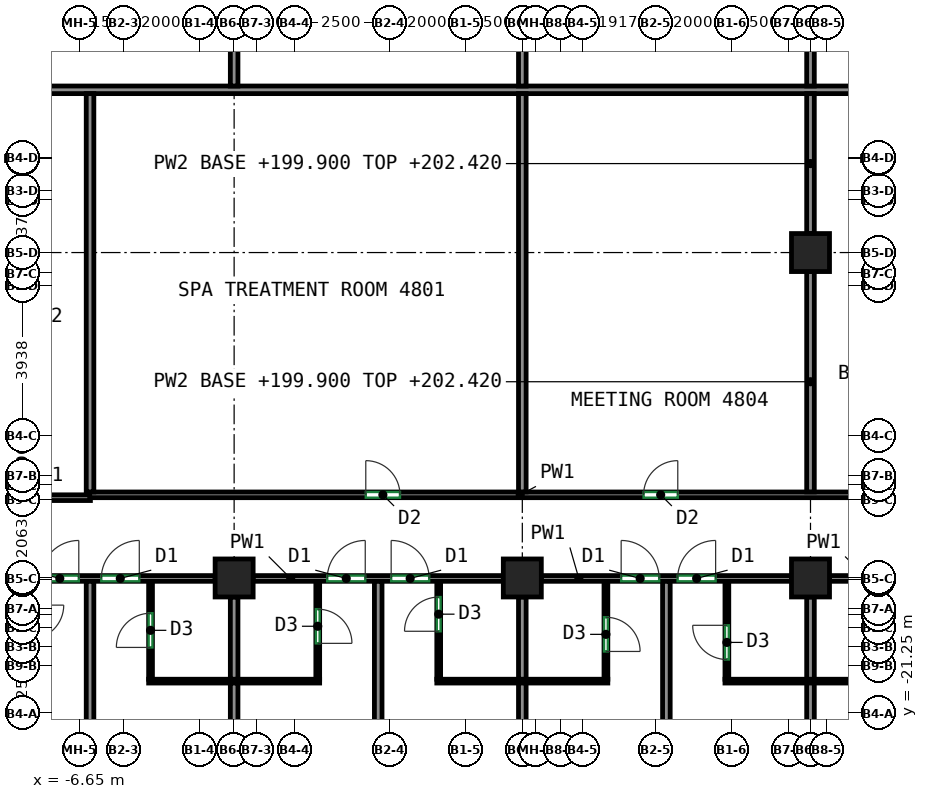
"""IFC4 building model, lengths in metres.
Left out: names, types, materials, properties, quantities, classifications, styles, units other than length and angle.
Written with IfcOpenShell. Run it as: python <this file> out.ifc"""

import sys

from ifc_helpers import new_model, si_unit, direction, frame, frame_2d, origin, origin_2d, place, context, subcontext, project, spatial, rectangle, extrude, source, transform, mapped, element, fill, save


model = new_model("IFC4")
c1 = context("Model", 3, precision=1e-05, world=origin(), true_north=direction((0.0, 1.0)))
c2 = subcontext(c1, "Body", "Model", "MODEL_VIEW")
j1 = project(units=[si_unit("LENGTHUNIT", "METRE"), si_unit("PLANEANGLEUNIT", "RADIAN")], contexts=[c1])
p1 = place(None, origin())
s1 = spatial("IfcSite", under=j1, at=p1, CompositionType="ELEMENT")
p2 = place(p1, origin())
s2 = spatial("IfcBuilding", under=s1, at=p2, CompositionType="ELEMENT")
p3 = place(p2, frame((0.0, 0.0, 199.9)))
s3 = spatial("IfcBuildingStorey", under=s2, at=p3, CompositionType="ELEMENT", Elevation=199.9)
m1 = source(origin(), c2, "Body", "SweptSolid", [
    extrude(rectangle(XDim=1.0, YDim=1.0, at=origin_2d()), origin(), (0.0, 0.0, 1.0), 3.12),
])
for number, where, z_axis, x_axis in (
    (1, (-2.583, -17.688, 0.0), (0.0, 0.0, 1.0), (1.0, 0.0, 0.0)),
    (2, (5.0, -17.688, 0.0), (0.0, 0.0, 1.0), (1.0, 0.0, 0.0)),
    (3, (12.583, -17.688, 0.0), (0.0, 0.0, 1.0), (1.0, 0.0, 0.0)),
    (4, (12.583, -9.125, 0.0), (0.0, 0.0, 1.0), (1.0, 0.0, 0.0)),
):
    element("IfcColumn", number, at=place(p3, frame(where, z_axis=z_axis, x_axis=x_axis)), inside=s3, PredefinedType="COLUMN", context=c2, shape_type="MappedRepresentation", body=[
        mapped(m1, transform((0.0, 0.0, 0.0))),
    ])
p4 = place(p3, frame((-9.667, -17.7, 0.0), z_axis=(0.0, 0.0, 1.0), x_axis=(1.0, 0.0, 0.0)))
e5 = element("IfcWall", 5, at=p4, inside=s3, PredefinedType="PARTITIONING", context=c2, shape_type="SweptSolid", body=[
    extrude(rectangle(XDim=6.584, YDim=0.15, at=frame_2d((3.292, 0.0))), origin(), (0.0, 0.0, 1.0), 3.12),
])
p5 = place(p4, frame((1.996, 0.0, 0.0)))
e6 = element("IfcOpeningElement", 6, at=p5, cuts=e5, PredefinedType="OPENING", context=c2, shape_type="SweptSolid", body=[
    extrude(rectangle(XDim=1.0, YDim=2.1, at=frame_2d((0.5, 1.05))), frame((0.0, 0.085, 0.0), z_axis=(0.0, -1.0, 0.0), x_axis=(1.0, 0.0, 0.0)), (0.0, 0.0, 1.0), 0.17),
])
p6 = place(p4, frame((3.588, 0.0, 0.0)))
e7 = element("IfcOpeningElement", 7, at=p6, cuts=e5, PredefinedType="OPENING", context=c2, shape_type="SweptSolid", body=[
    extrude(rectangle(XDim=1.0, YDim=2.1, at=frame_2d((0.5, 1.05))), frame((0.0, 0.085, 0.0), z_axis=(0.0, -1.0, 0.0), x_axis=(1.0, 0.0, 0.0)), (0.0, 0.0, 1.0), 0.17),
])
p7 = place(p3, frame((-2.083, -17.7, 0.0), z_axis=(0.0, 0.0, 1.0), x_axis=(1.0, 0.0, 0.0)))
e8 = element("IfcWall", 8, at=p7, inside=s3, PredefinedType="PARTITIONING", context=c2, shape_type="SweptSolid", body=[
    extrude(rectangle(XDim=6.583, YDim=0.15, at=frame_2d((3.292, 0.0))), origin(), (0.0, 0.0, 1.0), 3.12),
])
p8 = place(p7, frame((1.95, 0.0, 0.0)))
e9 = element("IfcOpeningElement", 9, at=p8, cuts=e8, PredefinedType="OPENING", context=c2, shape_type="SweptSolid", body=[
    extrude(rectangle(XDim=1.0, YDim=2.1, at=frame_2d((0.5, 1.05))), frame((0.0, 0.085, 0.0), z_axis=(0.0, -1.0, 0.0), x_axis=(1.0, 0.0, 0.0)), (0.0, 0.0, 1.0), 0.17),
])
p9 = place(p7, frame((3.632, 0.0, 0.0)))
e10 = element("IfcOpeningElement", 10, at=p9, cuts=e8, PredefinedType="OPENING", context=c2, shape_type="SweptSolid", body=[
    extrude(rectangle(XDim=1.0, YDim=2.1, at=frame_2d((0.5, 1.05))), frame((0.0, 0.085, 0.0), z_axis=(0.0, -1.0, 0.0), x_axis=(1.0, 0.0, 0.0)), (0.0, 0.0, 1.0), 0.17),
])
p10 = place(p3, frame((5.5, -17.7, 0.0), z_axis=(0.0, 0.0, 1.0), x_axis=(1.0, 0.0, 0.0)))
e11 = element("IfcWall", 11, at=p10, inside=s3, PredefinedType="PARTITIONING", context=c2, shape_type="SweptSolid", body=[
    extrude(rectangle(XDim=6.583, YDim=0.15, at=frame_2d((3.292, 0.0))), origin(), (0.0, 0.0, 1.0), 3.12),
])
p11 = place(p10, frame((2.101, 0.0, 0.0)))
e12 = element("IfcOpeningElement", 12, at=p11, cuts=e11, PredefinedType="OPENING", context=c2, shape_type="SweptSolid", body=[
    extrude(rectangle(XDim=1.0, YDim=2.1, at=frame_2d((0.5, 1.05))), frame((0.0, 0.085, 0.0), z_axis=(0.0, -1.0, 0.0), x_axis=(1.0, 0.0, 0.0)), (0.0, 0.0, 1.0), 0.17),
])
p12 = place(p10, frame((3.587, 0.0, 0.0)))
e13 = element("IfcOpeningElement", 13, at=p12, cuts=e11, PredefinedType="OPENING", context=c2, shape_type="SweptSolid", body=[
    extrude(rectangle(XDim=1.0, YDim=2.1, at=frame_2d((0.5, 1.05))), frame((0.0, 0.085, 0.0), z_axis=(0.0, -1.0, 0.0), x_axis=(1.0, 0.0, 0.0)), (0.0, 0.0, 1.0), 0.17),
])
p13 = place(p3, frame((13.083, -17.7, 0.0), z_axis=(0.0, 0.0, 1.0), x_axis=(1.0, 0.0, 0.0)))
e14 = element("IfcWall", 14, at=p13, inside=s3, PredefinedType="PARTITIONING", context=c2, shape_type="SweptSolid", body=[
    extrude(rectangle(XDim=6.584, YDim=0.15, at=frame_2d((3.292, 0.0))), origin(), (0.0, 0.0, 1.0), 3.12),
])
p14 = place(p13, frame((1.996, 0.0, 0.0)))
e15 = element("IfcOpeningElement", 15, at=p14, cuts=e14, PredefinedType="OPENING", context=c2, shape_type="SweptSolid", body=[
    extrude(rectangle(XDim=1.0, YDim=2.1, at=frame_2d((0.5, 1.05))), frame((0.0, 0.085, 0.0), z_axis=(0.0, -1.0, 0.0), x_axis=(1.0, 0.0, 0.0)), (0.0, 0.0, 1.0), 0.17),
])
p15 = place(p13, frame((3.588, 0.0, 0.0)))
e16 = element("IfcOpeningElement", 16, at=p15, cuts=e14, PredefinedType="OPENING", context=c2, shape_type="SweptSolid", body=[
    extrude(rectangle(XDim=1.0, YDim=2.1, at=frame_2d((0.5, 1.05))), frame((0.0, 0.085, 0.0), z_axis=(0.0, -1.0, 0.0), x_axis=(1.0, 0.0, 0.0)), (0.0, 0.0, 1.0), 0.17),
])
p16 = place(p3, frame((-6.365, -15.575, 0.0), z_axis=(0.0, 0.0, 1.0), x_axis=(-1.0, 0.0, 0.0)))
e17 = element("IfcWall", 17, at=p16, inside=s3, PredefinedType="PARTITIONING", context=c2, shape_type="SweptSolid", body=[
    extrude(rectangle(XDim=7.185, YDim=0.15, at=frame_2d((3.593, 0.0))), origin(), (0.0, 0.0, 1.0), 3.12),
])
p17 = place(p16, frame((3.143, 0.0, 0.0)))
e18 = element("IfcOpeningElement", 18, at=p17, cuts=e17, PredefinedType="OPENING", context=c2, shape_type="SweptSolid", body=[
    extrude(rectangle(XDim=0.9, YDim=2.1, at=frame_2d((0.45, 1.05))), frame((0.0, 0.085, 0.0), z_axis=(0.0, -1.0, 0.0), x_axis=(1.0, 0.0, 0.0)), (0.0, 0.0, 1.0), 0.17),
])
p18 = place(p3, frame((-6.385, -15.5, 0.0), z_axis=(0.0, 0.0, 1.0), x_axis=(1.0, 0.0, 0.0)))
e19 = element("IfcWall", 19, at=p18, inside=s3, PredefinedType="PARTITIONING", context=c2, shape_type="SweptSolid", body=[
    extrude(rectangle(XDim=22.66, YDim=0.15, at=frame_2d((11.33, 0.0))), origin(), (0.0, 0.0, 1.0), 3.12),
])
p19 = place(p18, frame((7.266, 0.0, 0.0)))
e20 = element("IfcOpeningElement", 20, at=p19, cuts=e19, PredefinedType="OPENING", context=c2, shape_type="SweptSolid", body=[
    extrude(rectangle(XDim=0.9, YDim=2.1, at=frame_2d((0.45, 1.05))), frame((0.0, 0.085, 0.0), z_axis=(0.0, -1.0, 0.0), x_axis=(1.0, 0.0, 0.0)), (0.0, 0.0, 1.0), 0.17),
])
p20 = place(p18, frame((14.576, 0.0, 0.0)))
e21 = element("IfcOpeningElement", 21, at=p20, cuts=e19, PredefinedType="OPENING", context=c2, shape_type="SweptSolid", body=[
    extrude(rectangle(XDim=0.9, YDim=2.1, at=frame_2d((0.45, 1.05))), frame((0.0, 0.085, 0.0), z_axis=(0.0, -1.0, 0.0), x_axis=(1.0, 0.0, 0.0)), (0.0, 0.0, 1.0), 0.17),
])
p21 = place(p3, frame((-6.375, -26.0, 0.0), z_axis=(0.0, 0.0, 1.0), x_axis=(0.0, 1.0, 0.0)))
e22 = element("IfcWall", 22, at=p21, inside=s3, PredefinedType="PARTITIONING", context=c2, shape_type="SweptSolid", body=[
    extrude(rectangle(XDim=8.223, YDim=0.2, at=frame_2d((4.111, 0.0))), origin(), (0.0, 0.0, 1.0), 3.12),
])
p22 = place(p3, frame((-4.783, -20.352, 0.0), z_axis=(0.0, 0.0, 1.0), x_axis=(0.0, 1.0, 0.0)))
e23 = element("IfcWall", 23, at=p22, inside=s3, PredefinedType="PARTITIONING", context=c2, shape_type="SweptSolid", body=[
    extrude(rectangle(XDim=2.575, YDim=0.1, at=frame_2d((1.288, 0.0))), origin(), (0.0, 0.0, 1.0), 3.12),
])
p23 = place(p22, frame((0.837, 0.0, 0.0)))
e24 = element("IfcOpeningElement", 24, at=p23, cuts=e23, PredefinedType="OPENING", context=c2, shape_type="SweptSolid", body=[
    extrude(rectangle(XDim=0.9, YDim=2.1, at=frame_2d((0.45, 1.05))), frame((0.0, 0.06, 0.0), z_axis=(0.0, -1.0, 0.0), x_axis=(1.0, 0.0, 0.0)), (0.0, 0.0, 1.0), 0.12),
])
p24 = place(p3, frame((-4.833, -20.402, 0.0), z_axis=(0.0, 0.0, 1.0), x_axis=(1.0, 0.0, 0.0)))
e25 = element("IfcWall", 25, at=p24, inside=s3, PredefinedType="PARTITIONING", context=c2, shape_type="SweptSolid", body=[
    extrude(rectangle(XDim=4.5, YDim=0.1, at=frame_2d((2.25, 0.0))), origin(), (0.0, 0.0, 1.0), 3.12),
])
p25 = place(p3, frame((-2.583, -25.425, 0.0), z_axis=(0.0, 0.0, 1.0), x_axis=(0.0, 1.0, 0.0)))
e26 = element("IfcWall", 26, at=p25, inside=s3, PredefinedType="PARTITIONING", context=c2, shape_type="SweptSolid", body=[
    extrude(rectangle(XDim=4.973, YDim=0.2, at=frame_2d((2.487, 0.0))), origin(), (0.0, 0.0, 1.0), 3.12),
])
p26 = place(p3, frame((-2.583, -20.352, 0.0), z_axis=(0.0, 0.0, 1.0), x_axis=(0.0, 1.0, 0.0)))
e27 = element("IfcWall", 27, at=p26, inside=s3, PredefinedType="PARTITIONING", context=c2, shape_type="SweptSolid", body=[
    extrude(rectangle(XDim=2.164, YDim=0.2, at=frame_2d((1.082, 0.0))), origin(), (0.0, 0.0, 1.0), 3.12),
])
p27 = place(p3, frame((-0.383, -17.777, 0.0), z_axis=(0.0, 0.0, 1.0), x_axis=(0.0, -1.0, 0.0)))
e28 = element("IfcWall", 28, at=p27, inside=s3, PredefinedType="PARTITIONING", context=c2, shape_type="SweptSolid", body=[
    extrude(rectangle(XDim=2.575, YDim=0.1, at=frame_2d((1.288, 0.0))), origin(), (0.0, 0.0, 1.0), 3.12),
])
p28 = place(p27, frame((0.731, 0.0, 0.0)))
e29 = element("IfcOpeningElement", 29, at=p28, cuts=e28, PredefinedType="OPENING", context=c2, shape_type="SweptSolid", body=[
    extrude(rectangle(XDim=0.9, YDim=2.1, at=frame_2d((0.45, 1.05))), frame((0.0, 0.06, 0.0), z_axis=(0.0, -1.0, 0.0), x_axis=(1.0, 0.0, 0.0)), (0.0, 0.0, 1.0), 0.12),
])
p29 = place(p3, frame((1.208, -26.0, 0.0), z_axis=(0.0, 0.0, 1.0), x_axis=(0.0, 1.0, 0.0)))
e30 = element("IfcWall", 30, at=p29, inside=s3, PredefinedType="PARTITIONING", context=c2, shape_type="SweptSolid", body=[
    extrude(rectangle(XDim=8.223, YDim=0.2, at=frame_2d((4.111, 0.0))), origin(), (0.0, 0.0, 1.0), 3.12),
])
p30 = place(p3, frame((2.8, -20.352, 0.0), z_axis=(0.0, 0.0, 1.0), x_axis=(0.0, 1.0, 0.0)))
e31 = element("IfcWall", 31, at=p30, inside=s3, PredefinedType="PARTITIONING", context=c2, shape_type="SweptSolid", body=[
    extrude(rectangle(XDim=2.575, YDim=0.1, at=frame_2d((1.288, 0.0))), origin(), (0.0, 0.0, 1.0), 3.12),
])
p31 = place(p30, frame((1.262, 0.0, 0.0)))
e32 = element("IfcOpeningElement", 32, at=p31, cuts=e31, PredefinedType="OPENING", context=c2, shape_type="SweptSolid", body=[
    extrude(rectangle(XDim=0.9, YDim=2.1, at=frame_2d((0.45, 1.05))), frame((0.0, 0.06, 0.0), z_axis=(0.0, -1.0, 0.0), x_axis=(1.0, 0.0, 0.0)), (0.0, 0.0, 1.0), 0.12),
])
p32 = place(p3, frame((2.75, -20.402, 0.0), z_axis=(0.0, 0.0, 1.0), x_axis=(1.0, 0.0, 0.0)))
e33 = element("IfcWall", 33, at=p32, inside=s3, PredefinedType="PARTITIONING", context=c2, shape_type="SweptSolid", body=[
    extrude(rectangle(XDim=4.5, YDim=0.1, at=frame_2d((2.25, 0.0))), origin(), (0.0, 0.0, 1.0), 3.12),
])
p33 = place(p3, frame((5.0, -25.425, 0.0), z_axis=(0.0, 0.0, 1.0), x_axis=(0.0, 1.0, 0.0)))
e34 = element("IfcWall", 34, at=p33, inside=s3, PredefinedType="PARTITIONING", context=c2, shape_type="SweptSolid", body=[
    extrude(rectangle(XDim=4.973, YDim=0.2, at=frame_2d((2.487, 0.0))), origin(), (0.0, 0.0, 1.0), 3.12),
])
p34 = place(p3, frame((5.0, -20.352, 0.0), z_axis=(0.0, 0.0, 1.0), x_axis=(0.0, 1.0, 0.0)))
e35 = element("IfcWall", 35, at=p34, inside=s3, PredefinedType="PARTITIONING", context=c2, shape_type="SweptSolid", body=[
    extrude(rectangle(XDim=2.164, YDim=0.2, at=frame_2d((1.082, 0.0))), origin(), (0.0, 0.0, 1.0), 3.12),
])
p35 = place(p3, frame((7.2, -17.777, 0.0), z_axis=(0.0, 0.0, 1.0), x_axis=(0.0, -1.0, 0.0)))
e36 = element("IfcWall", 36, at=p35, inside=s3, PredefinedType="PARTITIONING", context=c2, shape_type="SweptSolid", body=[
    extrude(rectangle(XDim=2.575, YDim=0.1, at=frame_2d((1.288, 0.0))), origin(), (0.0, 0.0, 1.0), 3.12),
])
p36 = place(p35, frame((0.944, 0.0, 0.0)))
e37 = element("IfcOpeningElement", 37, at=p36, cuts=e36, PredefinedType="OPENING", context=c2, shape_type="SweptSolid", body=[
    extrude(rectangle(XDim=0.9, YDim=2.1, at=frame_2d((0.45, 1.05))), frame((0.0, 0.06, 0.0), z_axis=(0.0, -1.0, 0.0), x_axis=(1.0, 0.0, 0.0)), (0.0, 0.0, 1.0), 0.12),
])
p37 = place(p3, frame((8.791, -26.0, 0.0), z_axis=(0.0, 0.0, 1.0), x_axis=(0.0, 1.0, 0.0)))
e38 = element("IfcWall", 38, at=p37, inside=s3, PredefinedType="PARTITIONING", context=c2, shape_type="SweptSolid", body=[
    extrude(rectangle(XDim=8.223, YDim=0.2, at=frame_2d((4.111, 0.0))), origin(), (0.0, 0.0, 1.0), 3.12),
])
p38 = place(p3, frame((10.383, -20.352, 0.0), z_axis=(0.0, 0.0, 1.0), x_axis=(0.0, 1.0, 0.0)))
e39 = element("IfcWall", 39, at=p38, inside=s3, PredefinedType="PARTITIONING", context=c2, shape_type="SweptSolid", body=[
    extrude(rectangle(XDim=2.575, YDim=0.1, at=frame_2d((1.288, 0.0))), origin(), (0.0, 0.0, 1.0), 3.12),
])
p39 = place(p38, frame((0.519, 0.0, 0.0)))
e40 = element("IfcOpeningElement", 40, at=p39, cuts=e39, PredefinedType="OPENING", context=c2, shape_type="SweptSolid", body=[
    extrude(rectangle(XDim=0.9, YDim=2.1, at=frame_2d((0.45, 1.05))), frame((0.0, 0.06, 0.0), z_axis=(0.0, -1.0, 0.0), x_axis=(1.0, 0.0, 0.0)), (0.0, 0.0, 1.0), 0.12),
])
p40 = place(p3, frame((10.333, -20.402, 0.0), z_axis=(0.0, 0.0, 1.0), x_axis=(1.0, 0.0, 0.0)))
e41 = element("IfcWall", 41, at=p40, inside=s3, PredefinedType="PARTITIONING", context=c2, shape_type="SweptSolid", body=[
    extrude(rectangle(XDim=4.5, YDim=0.1, at=frame_2d((2.25, 0.0))), origin(), (0.0, 0.0, 1.0), 3.12),
])
p41 = place(p3, frame((12.583, -25.425, 0.0), z_axis=(0.0, 0.0, 1.0), x_axis=(0.0, 1.0, 0.0)))
e42 = element("IfcWall", 42, at=p41, inside=s3, PredefinedType="PARTITIONING", context=c2, shape_type="SweptSolid", body=[
    extrude(rectangle(XDim=4.973, YDim=0.2, at=frame_2d((2.487, 0.0))), origin(), (0.0, 0.0, 1.0), 3.12),
])
p42 = place(p3, frame((12.583, -20.352, 0.0), z_axis=(0.0, 0.0, 1.0), x_axis=(0.0, 1.0, 0.0)))
e43 = element("IfcWall", 43, at=p42, inside=s3, PredefinedType="PARTITIONING", context=c2, shape_type="SweptSolid", body=[
    extrude(rectangle(XDim=2.164, YDim=0.2, at=frame_2d((1.082, 0.0))), origin(), (0.0, 0.0, 1.0), 3.12),
])
p43 = place(p3, frame((-13.873, -4.843, 0.0), z_axis=(0.0, 0.0, 1.0), x_axis=(1.0, 0.0, 0.0)))
e44 = element("IfcWall", 44, at=p43, inside=s3, PredefinedType="PARTITIONING", context=c2, shape_type="SweptSolid", body=[
    extrude(rectangle(XDim=30.146, YDim=0.2, at=frame_2d((15.073, 0.0))), origin(), (0.0, 0.0, 1.0), 3.12),
])
for number, where, z_axis, x_axis in (
    (45, (-2.583, -4.743, 0.0), (0.0, 0.0, 1.0), (0.0, 1.0, 0.0)),
    (46, (5.0, -4.743, 0.0), (0.0, 0.0, 1.0), (0.0, 1.0, 0.0)),
):
    element("IfcWall", number, at=place(p3, frame(where, z_axis=z_axis, x_axis=x_axis)), inside=s3, PredefinedType="PARTITIONING", context=c2, shape_type="SweptSolid", body=[
        extrude(rectangle(XDim=8.366, YDim=0.2, at=frame_2d((4.183, 0.0))), origin(), (0.0, 0.0, 1.0), 3.12),
    ])
p44 = place(p3, frame((12.583, -4.743, 0.0), z_axis=(0.0, 0.0, 1.0), x_axis=(0.0, 1.0, 0.0)))
e47 = element("IfcWall", 47, at=p44, inside=s3, PredefinedType="PARTITIONING", context=c2, shape_type="SweptSolid", body=[
    extrude(rectangle(XDim=3.681, YDim=0.2, at=frame_2d((1.84, 0.0))), origin(), (0.0, 0.0, 1.0), 2.52),
])
for number, where, z_axis, x_axis in (
    (48, (-6.375, -15.423, 0.0), (0.0, 0.0, 1.0), (0.0, 1.0, 0.0)),
    (49, (5.0, -15.423, 0.0), (0.0, 0.0, 1.0), (0.0, 1.0, 0.0)),
):
    element("IfcWall", number, at=place(p3, frame(where, z_axis=z_axis, x_axis=x_axis)), inside=s3, PredefinedType="PARTITIONING", context=c2, shape_type="SweptSolid", body=[
        extrude(rectangle(XDim=10.48, YDim=0.2, at=frame_2d((5.24, 0.0))), origin(), (0.0, 0.0, 1.0), 3.12),
    ])
p45 = place(p3, frame((12.583, -8.625, 0.0), z_axis=(0.0, 0.0, 1.0), x_axis=(0.0, 1.0, 0.0)))
e50 = element("IfcWall", 50, at=p45, inside=s3, PredefinedType="PARTITIONING", context=c2, shape_type="SweptSolid", body=[
    extrude(rectangle(XDim=3.682, YDim=0.2, at=frame_2d((1.841, 0.0))), origin(), (0.0, 0.0, 1.0), 2.52),
])
p46 = place(p3, frame((12.583, -15.423, 0.0), z_axis=(0.0, 0.0, 1.0), x_axis=(0.0, 1.0, 0.0)))
e51 = element("IfcWall", 51, at=p46, inside=s3, PredefinedType="PARTITIONING", context=c2, shape_type="SweptSolid", body=[
    extrude(rectangle(XDim=5.798, YDim=0.2, at=frame_2d((2.899, 0.0))), origin(), (0.0, 0.0, 1.0), 2.52),
])
p47 = place(p39, origin())
e52 = element("IfcDoor", 52, at=p47, inside=s3, OperationType="SINGLE_SWING_RIGHT", PredefinedType="DOOR", context=c2, shape_type="SweptSolid", body=[
    extrude(rectangle(XDim=0.9, YDim=2.1, at=frame_2d((0.45, 1.05))), frame((0.0, 0.025, 0.0), z_axis=(0.0, -1.0, 0.0), x_axis=(1.0, 0.0, 0.0)), (0.0, 0.0, 1.0), 0.05),
])
fill(e40, e52)
p48 = place(p36, origin())
e53 = element("IfcDoor", 53, at=p48, inside=s3, OperationType="SINGLE_SWING_RIGHT", PredefinedType="DOOR", context=c2, shape_type="SweptSolid", body=[
    extrude(rectangle(XDim=0.9, YDim=2.1, at=frame_2d((0.45, 1.05))), frame((0.0, 0.025, 0.0), z_axis=(0.0, -1.0, 0.0), x_axis=(1.0, 0.0, 0.0)), (0.0, 0.0, 1.0), 0.05),
])
fill(e37, e53)
p49 = place(p23, origin())
e54 = element("IfcDoor", 54, at=p49, inside=s3, OperationType="SINGLE_SWING_LEFT", PredefinedType="DOOR", context=c2, shape_type="SweptSolid", body=[
    extrude(rectangle(XDim=0.9, YDim=2.1, at=frame_2d((0.45, 1.05))), frame((0.0, 0.025, 0.0), z_axis=(0.0, -1.0, 0.0), x_axis=(1.0, 0.0, 0.0)), (0.0, 0.0, 1.0), 0.05),
])
fill(e24, e54)
p50 = place(p28, origin())
e55 = element("IfcDoor", 55, at=p50, inside=s3, OperationType="SINGLE_SWING_RIGHT", PredefinedType="DOOR", context=c2, shape_type="SweptSolid", body=[
    extrude(rectangle(XDim=0.9, YDim=2.1, at=frame_2d((0.45, 1.05))), frame((0.0, 0.025, 0.0), z_axis=(0.0, -1.0, 0.0), x_axis=(1.0, 0.0, 0.0)), (0.0, 0.0, 1.0), 0.05),
])
fill(e29, e55)
p51 = place(p31, origin())
e56 = element("IfcDoor", 56, at=p51, inside=s3, OperationType="SINGLE_SWING_LEFT", PredefinedType="DOOR", context=c2, shape_type="SweptSolid", body=[
    extrude(rectangle(XDim=0.9, YDim=2.1, at=frame_2d((0.45, 1.05))), frame((0.0, 0.025, 0.0), z_axis=(0.0, -1.0, 0.0), x_axis=(1.0, 0.0, 0.0)), (0.0, 0.0, 1.0), 0.05),
])
fill(e32, e56)
p52 = place(p5, origin())
e57 = element("IfcDoor", 57, at=p52, inside=s3, OperationType="SINGLE_SWING_RIGHT", PredefinedType="DOOR", context=c2, shape_type="SweptSolid", body=[
    extrude(rectangle(XDim=1.0, YDim=2.1, at=frame_2d((0.5, 1.05))), frame((0.0, 0.025, 0.0), z_axis=(0.0, -1.0, 0.0), x_axis=(1.0, 0.0, 0.0)), (0.0, 0.0, 1.0), 0.05),
])
fill(e6, e57)
p53 = place(p6, origin())
e58 = element("IfcDoor", 58, at=p53, inside=s3, OperationType="SINGLE_SWING_RIGHT", PredefinedType="DOOR", context=c2, shape_type="SweptSolid", body=[
    extrude(rectangle(XDim=1.0, YDim=2.1, at=frame_2d((0.5, 1.05))), frame((0.0, 0.025, 0.0), z_axis=(0.0, -1.0, 0.0), x_axis=(1.0, 0.0, 0.0)), (0.0, 0.0, 1.0), 0.05),
])
fill(e7, e58)
p54 = place(p8, origin())
e59 = element("IfcDoor", 59, at=p54, inside=s3, OperationType="SINGLE_SWING_RIGHT", PredefinedType="DOOR", context=c2, shape_type="SweptSolid", body=[
    extrude(rectangle(XDim=1.0, YDim=2.1, at=frame_2d((0.5, 1.05))), frame((0.0, 0.025, 0.0), z_axis=(0.0, -1.0, 0.0), x_axis=(1.0, 0.0, 0.0)), (0.0, 0.0, 1.0), 0.05),
])
fill(e9, e59)
p55 = place(p9, origin())
e60 = element("IfcDoor", 60, at=p55, inside=s3, OperationType="SINGLE_SWING_LEFT", PredefinedType="DOOR", context=c2, shape_type="SweptSolid", body=[
    extrude(rectangle(XDim=1.0, YDim=2.1, at=frame_2d((0.5, 1.05))), frame((0.0, 0.025, 0.0), z_axis=(0.0, -1.0, 0.0), x_axis=(1.0, 0.0, 0.0)), (0.0, 0.0, 1.0), 0.05),
])
fill(e10, e60)
p56 = place(p11, origin())
e61 = element("IfcDoor", 61, at=p56, inside=s3, OperationType="SINGLE_SWING_LEFT", PredefinedType="DOOR", context=c2, shape_type="SweptSolid", body=[
    extrude(rectangle(XDim=1.0, YDim=2.1, at=frame_2d((0.5, 1.05))), frame((0.0, 0.025, 0.0), z_axis=(0.0, -1.0, 0.0), x_axis=(1.0, 0.0, 0.0)), (0.0, 0.0, 1.0), 0.05),
])
fill(e12, e61)
p57 = place(p12, origin())
e62 = element("IfcDoor", 62, at=p57, inside=s3, OperationType="SINGLE_SWING_RIGHT", PredefinedType="DOOR", context=c2, shape_type="SweptSolid", body=[
    extrude(rectangle(XDim=1.0, YDim=2.1, at=frame_2d((0.5, 1.05))), frame((0.0, 0.025, 0.0), z_axis=(0.0, -1.0, 0.0), x_axis=(1.0, 0.0, 0.0)), (0.0, 0.0, 1.0), 0.05),
])
fill(e13, e62)
p58 = place(p19, origin())
e63 = element("IfcDoor", 63, at=p58, inside=s3, OperationType="SINGLE_SWING_LEFT", PredefinedType="DOOR", context=c2, shape_type="SweptSolid", body=[
    extrude(rectangle(XDim=0.9, YDim=2.1, at=frame_2d((0.45, 1.05))), frame((0.0, 0.025, 0.0), z_axis=(0.0, -1.0, 0.0), x_axis=(1.0, 0.0, 0.0)), (0.0, 0.0, 1.0), 0.05),
])
fill(e20, e63)
p59 = place(p20, origin())
e64 = element("IfcDoor", 64, at=p59, inside=s3, OperationType="SINGLE_SWING_RIGHT", PredefinedType="DOOR", context=c2, shape_type="SweptSolid", body=[
    extrude(rectangle(XDim=0.9, YDim=2.1, at=frame_2d((0.45, 1.05))), frame((0.0, 0.025, 0.0), z_axis=(0.0, -1.0, 0.0), x_axis=(1.0, 0.0, 0.0)), (0.0, 0.0, 1.0), 0.05),
])
fill(e21, e64)
save(model, sys.argv[1])
